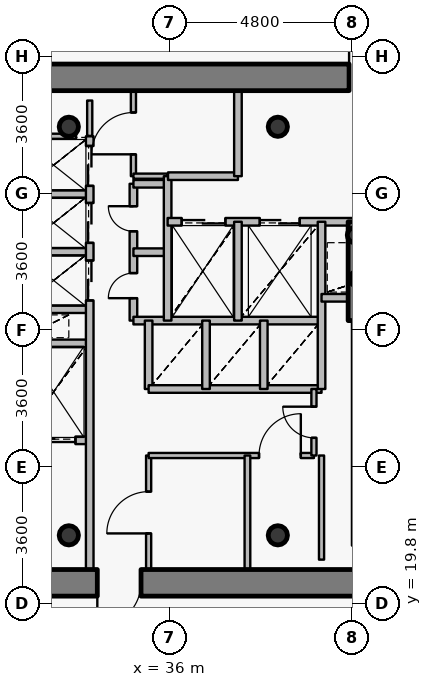
"""IFC4 building model, lengths in metres.
Left out: names, types, materials, properties, quantities, classifications, styles, units other than length and angle.
Written with IfcOpenShell. Run it as: python <this file> out.ifc"""

import sys

from ifc_helpers import new_model, si_unit, direction, frame, frame_2d, origin, origin_2d, place, context, subcontext, project, spatial, rectangle, hollow_circle, extrude, source, transform, mapped, element, fill, save


model = new_model("IFC4")
c1 = context("Model", 3, precision=1e-05, world=origin(), true_north=direction((0.0, 1.0)))
c2 = subcontext(c1, "Body", "Model", "MODEL_VIEW")
j1 = project(units=[si_unit("LENGTHUNIT", "METRE"), si_unit("PLANEANGLEUNIT", "RADIAN")], contexts=[c1])
p1 = place(None, origin())
s1 = spatial("IfcSite", under=j1, at=p1, CompositionType="ELEMENT")
p2 = place(p1, origin())
s2 = spatial("IfcBuilding", under=s1, at=p2, CompositionType="ELEMENT")
p3 = place(p2, frame((0.0, 0.0, 259.05)))
s3 = spatial("IfcBuildingStorey", under=s2, at=p3, CompositionType="ELEMENT", Elevation=259.05)
for number, where, z_axis, x_axis in (
    (1, (33.35, 21.6, 0.0), (0.0, 0.0, 1.0), (1.0, 0.0, 0.0)),
    (2, (38.85, 21.6, 0.0), (0.0, 0.0, 1.0), (1.0, 0.0, 0.0)),
    (3, (38.85, 32.35, 0.0), (0.0, 0.0, 1.0), (1.0, 0.0, 0.0)),
    (4, (33.35, 32.35, 0.0), (0.0, 0.0, 1.0), (1.0, 0.0, 0.0)),
):
    element("IfcColumn", number, at=place(p3, frame(where, z_axis=z_axis, x_axis=x_axis)), inside=s3, PredefinedType="COLUMN", context=c2, shape_type="SweptSolid", body=[
        extrude(hollow_circle(Radius=0.254, WallThickness=0.02, at=origin_2d()), origin(), (0.0, 0.0, 1.0), 3.75),
    ])
for number, where, z_axis, x_axis in (
    (5, (40.95, 28.35, 0.0), (0.0, 0.0, 1.0), (1.0, 0.0, 0.0)),
    (6, (40.88, 29.5, 0.0), (0.0, 0.0, 1.0), (1.0, 0.0, 0.0)),
):
    element("IfcColumn", number, at=place(p3, frame(where, z_axis=z_axis, x_axis=x_axis)), inside=s3, PredefinedType="COLUMN", context=c2, shape_type="SweptSolid", body=[
        extrude(hollow_circle(Radius=0.203, WallThickness=0.016, at=origin_2d()), origin(), (0.0, 0.0, 1.0), 3.75),
    ])
p4 = place(p3, frame((27.05, 33.65, 0.0), z_axis=(0.0, 0.0, 1.0), x_axis=(1.0, 0.0, 0.0)))
e7 = element("IfcWall", 7, at=p4, inside=s3, PredefinedType="SHEAR", context=c2, shape_type="SweptSolid", body=[
    extrude(rectangle(XDim=17.9, YDim=0.7, at=frame_2d((8.95, 0.0))), origin(), (0.0, 0.0, 1.0), 3.0),
])
p5 = place(p4, frame((13.675, 0.0, 0.0)))
e8 = element("IfcOpeningElement", 8, at=p5, cuts=e7, PredefinedType="OPENING", context=c2, shape_type="SweptSolid", body=[
    extrude(rectangle(XDim=1.15, YDim=2.15, at=origin_2d()), frame((0.575, 0.36, 1.075), z_axis=(0.0, -1.0, 0.0), x_axis=(1.0, 0.0, 0.0)), (0.0, 0.0, 1.0), 0.72),
])
p6 = place(p3, frame((44.95, 20.35, 0.0), z_axis=(0.0, 0.0, 1.0), x_axis=(-1.0, 0.0, 0.0)))
e9 = element("IfcWall", 9, at=p6, inside=s3, PredefinedType="SHEAR", context=c2, shape_type="SweptSolid", body=[
    extrude(rectangle(XDim=17.9, YDim=0.7, at=frame_2d((8.95, 0.0))), origin(), (0.0, 0.0, 1.0), 3.0),
])
p7 = place(p6, frame((9.7, 0.0, 0.0)))
e10 = element("IfcOpeningElement", 10, at=p7, cuts=e9, PredefinedType="OPENING", context=c2, shape_type="SweptSolid", body=[
    extrude(rectangle(XDim=1.15, YDim=2.15, at=origin_2d()), frame((0.575, 0.36, 1.075), z_axis=(0.0, -1.0, 0.0), x_axis=(1.0, 0.0, 0.0)), (0.0, 0.0, 1.0), 0.72),
])
p8 = place(p3, frame((40.9, 27.25, 0.0), z_axis=(0.0, 0.0, 1.0), x_axis=(0.0, 1.0, 0.0)))
e11 = element("IfcWall", 11, at=p8, inside=s3, PredefinedType="SHEAR", context=c2, shape_type="SweptSolid", body=[
    extrude(rectangle(XDim=2.6, YDim=0.4, at=frame_2d((1.3, 0.0))), origin(), (0.0, 0.0, 1.0), 3.05),
])
p9 = place(p3, frame((32.0, 24.1, 0.0), z_axis=(0.0, 0.0, 1.0), x_axis=(1.0, 0.0, 0.0)))
e12 = element("IfcWall", 12, at=p9, inside=s3, PredefinedType="PARTITIONING", context=c2, shape_type="SweptSolid", body=[
    extrude(rectangle(XDim=1.9, YDim=0.2, at=frame_2d((0.95, 0.0))), origin(), (0.0, 0.0, 1.0), 3.035),
])
p10 = place(p9, frame((0.375, 0.0, 0.0)))
e13 = element("IfcOpeningElement", 13, at=p10, cuts=e12, PredefinedType="OPENING", context=c2, shape_type="SweptSolid", body=[
    extrude(rectangle(XDim=1.15, YDim=2.15, at=origin_2d()), frame((0.575, 0.11, 1.075), z_axis=(0.0, -1.0, 0.0), x_axis=(1.0, 0.0, 0.0)), (0.0, 0.0, 1.0), 0.22),
])
for number, where, z_axis, x_axis in (
    (14, (32.0, 26.65, 0.0), (0.0, 0.0, 1.0), (1.0, 0.0, 0.0)),
    (15, (32.0, 27.55, 0.0), (0.0, 0.0, 1.0), (1.0, 0.0, 0.0)),
    (16, (32.0, 29.06, 0.0), (0.0, 0.0, 1.0), (1.0, 0.0, 0.0)),
    (17, (32.0, 30.58, 0.0), (0.0, 0.0, 1.0), (1.0, 0.0, 0.0)),
):
    element("IfcWall", number, at=place(p3, frame(where, z_axis=z_axis, x_axis=x_axis)), inside=s3, PredefinedType="PARTITIONING", context=c2, shape_type="SweptSolid", body=[
        extrude(rectangle(XDim=1.9, YDim=0.2, at=frame_2d((0.95, 0.0))), origin(), (0.0, 0.0, 1.0), 3.035),
    ])
p11 = place(p3, frame((33.9, 20.7, 0.0), z_axis=(0.0, 0.0, 1.0), x_axis=(0.0, 1.0, 0.0)))
e18 = element("IfcWall", 18, at=p11, inside=s3, PredefinedType="PARTITIONING", context=c2, shape_type="SweptSolid", body=[
    extrude(rectangle(XDim=11.4, YDim=0.2, at=frame_2d((5.7, 0.0))), origin(), (0.0, 0.0, 1.0), 3.035),
])
p12 = place(p11, frame((7.08, 0.0, 0.0)))
e19 = element("IfcOpeningElement", 19, at=p12, cuts=e18, PredefinedType="OPENING", context=c2, shape_type="SweptSolid", body=[
    extrude(rectangle(XDim=1.05, YDim=2.15, at=origin_2d()), frame((0.525, 0.11, 1.075), z_axis=(0.0, -1.0, 0.0), x_axis=(1.0, 0.0, 0.0)), (0.0, 0.0, 1.0), 0.22),
])
p13 = place(p11, frame((8.595, 0.0, 0.0)))
e20 = element("IfcOpeningElement", 20, at=p13, cuts=e18, PredefinedType="OPENING", context=c2, shape_type="SweptSolid", body=[
    extrude(rectangle(XDim=1.05, YDim=2.15, at=origin_2d()), frame((0.525, 0.11, 1.075), z_axis=(0.0, -1.0, 0.0), x_axis=(1.0, 0.0, 0.0)), (0.0, 0.0, 1.0), 0.22),
])
p14 = place(p11, frame((10.095, 0.0, 0.0)))
e21 = element("IfcOpeningElement", 21, at=p14, cuts=e18, PredefinedType="OPENING", context=c2, shape_type="SweptSolid", body=[
    extrude(rectangle(XDim=1.05, YDim=2.15, at=origin_2d()), frame((0.525, 0.11, 1.075), z_axis=(0.0, -1.0, 0.0), x_axis=(1.0, 0.0, 0.0)), (0.0, 0.0, 1.0), 0.22),
])
p15 = place(p3, frame((35.05, 27.25, 0.0), z_axis=(0.0, 0.0, 1.0), x_axis=(0.0, 1.0, 0.0)))
e22 = element("IfcWall", 22, at=p15, inside=s3, PredefinedType="PARTITIONING", context=c2, shape_type="SweptSolid", body=[
    extrude(rectangle(XDim=3.6, YDim=0.2, at=frame_2d((1.8, 0.0))), origin(), (0.0, 0.0, 1.0), 3.45),
])
p16 = place(p15, frame((0.59, 0.0, 0.0)))
e23 = element("IfcOpeningElement", 23, at=p16, cuts=e22, PredefinedType="OPENING", context=c2, shape_type="SweptSolid", body=[
    extrude(rectangle(XDim=0.66, YDim=2.05, at=origin_2d()), frame((0.33, 0.11, 1.025), z_axis=(0.0, -1.0, 0.0), x_axis=(1.0, 0.0, 0.0)), (0.0, 0.0, 1.0), 0.22),
])
p17 = place(p15, frame((2.35, 0.0, 0.0)))
e24 = element("IfcOpeningElement", 24, at=p17, cuts=e22, PredefinedType="OPENING", context=c2, shape_type="SweptSolid", body=[
    extrude(rectangle(XDim=0.66, YDim=2.05, at=origin_2d()), frame((0.33, 0.11, 1.025), z_axis=(0.0, -1.0, 0.0), x_axis=(1.0, 0.0, 0.0)), (0.0, 0.0, 1.0), 0.22),
])
p18 = place(p3, frame((35.05, 27.25, 0.0), z_axis=(0.0, 0.0, 1.0), x_axis=(1.0, 0.0, 0.0)))
e25 = element("IfcWall", 25, at=p18, inside=s3, PredefinedType="PARTITIONING", context=c2, shape_type="SweptSolid", body=[
    extrude(rectangle(XDim=4.95, YDim=0.2, at=frame_2d((2.475, 0.0))), origin(), (0.0, 0.0, 1.0), 3.035),
])
for number, where, z_axis, x_axis in (
    (26, (35.05, 29.05, 0.0), (0.0, 0.0, 1.0), (1.0, 0.0, 0.0)),
    (27, (35.05, 30.85, 0.0), (0.0, 0.0, 1.0), (1.0, 0.0, 0.0)),
):
    element("IfcWall", number, at=place(p3, frame(where, z_axis=z_axis, x_axis=x_axis)), inside=s3, PredefinedType="PARTITIONING", context=c2, shape_type="SweptSolid", body=[
        extrude(rectangle(XDim=0.9, YDim=0.2, at=frame_2d((0.45, 0.0))), origin(), (0.0, 0.0, 1.0), 3.45),
    ])
p19 = place(p3, frame((35.05, 31.05, 0.0), z_axis=(0.0, 0.0, 1.0), x_axis=(0.0, 1.0, 0.0)))
e28 = element("IfcWall", 28, at=p19, inside=s3, PredefinedType="PARTITIONING", context=c2, shape_type="SweptSolid", body=[
    extrude(rectangle(XDim=2.25, YDim=0.135, at=frame_2d((1.125, 0.0))), origin(), (0.0, 0.0, 1.0), 3.035),
])
p20 = place(p19, frame((0.575, 0.0, 0.0)))
e29 = element("IfcOpeningElement", 29, at=p20, cuts=e28, PredefinedType="OPENING", context=c2, shape_type="SweptSolid", body=[
    extrude(rectangle(XDim=1.1, YDim=2.15, at=origin_2d()), frame((0.55, 0.078, 1.075), z_axis=(0.0, -1.0, 0.0), x_axis=(1.0, 0.0, 0.0)), (0.0, 0.0, 1.0), 0.155),
])
p21 = place(p3, frame((35.05, 31.05, 0.0), z_axis=(0.0, 0.0, 1.0), x_axis=(1.0, 0.0, 0.0)))
e30 = element("IfcWall", 30, at=p21, inside=s3, PredefinedType="PARTITIONING", context=c2, shape_type="SweptSolid", body=[
    extrude(rectangle(XDim=0.9, YDim=0.135, at=frame_2d((0.45, 0.0))), origin(), (0.0, 0.0, 1.0), 3.45),
])
p22 = place(p3, frame((35.45, 20.7, 0.0), z_axis=(0.0, 0.0, 1.0), x_axis=(0.0, 1.0, 0.0)))
e31 = element("IfcWall", 31, at=p22, inside=s3, PredefinedType="PARTITIONING", context=c2, shape_type="SweptSolid", body=[
    extrude(rectangle(XDim=3.0, YDim=0.135, at=frame_2d((1.5, 0.0))), origin(), (0.0, 0.0, 1.0), 3.035),
])
p23 = place(p22, frame((0.95, 0.0, 0.0)))
e32 = element("IfcOpeningElement", 32, at=p23, cuts=e31, PredefinedType="OPENING", context=c2, shape_type="SweptSolid", body=[
    extrude(rectangle(XDim=1.1, YDim=2.15, at=origin_2d()), frame((0.55, 0.078, 1.075), z_axis=(0.0, -1.0, 0.0), x_axis=(1.0, 0.0, 0.0)), (0.0, 0.0, 1.0), 0.155),
])
p24 = place(p3, frame((35.45, 23.7, 0.0), z_axis=(0.0, 0.0, 1.0), x_axis=(1.0, 0.0, 0.0)))
e33 = element("IfcWall", 33, at=p24, inside=s3, PredefinedType="PARTITIONING", context=c2, shape_type="SweptSolid", body=[
    extrude(rectangle(XDim=4.35, YDim=0.135, at=frame_2d((2.175, 0.0))), origin(), (0.0, 0.0, 1.0), 3.035),
])
p25 = place(p24, frame((2.905, 0.0, 0.0)))
e34 = element("IfcOpeningElement", 34, at=p25, cuts=e33, PredefinedType="OPENING", context=c2, shape_type="SweptSolid", body=[
    extrude(rectangle(XDim=1.1, YDim=2.15, at=origin_2d()), frame((0.55, 0.078, 1.075), z_axis=(0.0, -1.0, 0.0), x_axis=(1.0, 0.0, 0.0)), (0.0, 0.0, 1.0), 0.155),
])
p26 = place(p3, frame((35.45, 25.45, 0.0), z_axis=(0.0, 0.0, 1.0), x_axis=(0.0, 1.0, 0.0)))
e35 = element("IfcWall", 35, at=p26, inside=s3, PredefinedType="PARTITIONING", context=c2, shape_type="SweptSolid", body=[
    extrude(rectangle(XDim=1.8, YDim=0.2, at=frame_2d((0.9, 0.0))), origin(), (0.0, 0.0, 1.0), 3.45),
])
p27 = place(p3, frame((35.45, 25.45, 0.0), z_axis=(0.0, 0.0, 1.0), x_axis=(1.0, 0.0, 0.0)))
e36 = element("IfcWall", 36, at=p27, inside=s3, PredefinedType="PARTITIONING", context=c2, shape_type="SweptSolid", body=[
    extrude(rectangle(XDim=4.55, YDim=0.2, at=frame_2d((2.275, 0.0))), origin(), (0.0, 0.0, 1.0), 3.035),
])
p28 = place(p3, frame((35.95, 27.25, 0.0), z_axis=(0.0, 0.0, 1.0), x_axis=(0.0, 1.0, 0.0)))
e37 = element("IfcWall", 37, at=p28, inside=s3, PredefinedType="PARTITIONING", context=c2, shape_type="SweptSolid", body=[
    extrude(rectangle(XDim=3.8, YDim=0.2, at=frame_2d((1.9, 0.0))), origin(), (0.0, 0.0, 1.0), 3.45),
])
p29 = place(p3, frame((35.95, 29.85, 0.0), z_axis=(0.0, 0.0, 1.0), x_axis=(1.0, 0.0, 0.0)))
e38 = element("IfcWall", 38, at=p29, inside=s3, PredefinedType="PARTITIONING", context=c2, shape_type="SweptSolid", body=[
    extrude(rectangle(XDim=8.49, YDim=0.2, at=frame_2d((4.245, 0.0))), origin(), (0.0, 0.0, 1.0), 3.035),
])
p30 = place(p29, frame((6.1, 0.0, 0.0)))
e39 = element("IfcOpeningElement", 39, at=p30, cuts=e38, PredefinedType="OPENING", context=c2, shape_type="SweptSolid", body=[
    extrude(rectangle(XDim=1.2, YDim=2.15, at=origin_2d()), frame((0.6, 0.11, 1.075), z_axis=(0.0, -1.0, 0.0), x_axis=(1.0, 0.0, 0.0)), (0.0, 0.0, 1.0), 0.22),
])
p31 = place(p29, frame((0.37, 0.0, 0.0)))
e40 = element("IfcOpeningElement", 40, at=p31, cuts=e38, PredefinedType="OPENING", context=c2, shape_type="SweptSolid", body=[
    extrude(rectangle(XDim=1.15, YDim=2.15, at=origin_2d()), frame((0.575, 0.11, 1.075), z_axis=(0.0, -1.0, 0.0), x_axis=(1.0, 0.0, 0.0)), (0.0, 0.0, 1.0), 0.22),
])
p32 = place(p29, frame((2.425, 0.0, 0.0)))
e41 = element("IfcOpeningElement", 41, at=p32, cuts=e38, PredefinedType="OPENING", context=c2, shape_type="SweptSolid", body=[
    extrude(rectangle(XDim=1.05, YDim=2.15, at=origin_2d()), frame((0.525, 0.11, 1.075), z_axis=(0.0, -1.0, 0.0), x_axis=(1.0, 0.0, 0.0)), (0.0, 0.0, 1.0), 0.22),
])
p33 = place(p3, frame((35.96, 31.05, 0.0), z_axis=(0.0, 0.0, 1.0), x_axis=(1.0, 0.0, 0.0)))
e42 = element("IfcWall", 42, at=p33, inside=s3, PredefinedType="PARTITIONING", context=c2, shape_type="SweptSolid", body=[
    extrude(rectangle(XDim=1.84, YDim=0.2, at=frame_2d((0.92, 0.0))), origin(), (0.0, 0.0, 1.0), 3.45),
])
p34 = place(p3, frame((36.96, 25.45, 0.0), z_axis=(0.0, 0.0, 1.0), x_axis=(0.0, 1.0, 0.0)))
e43 = element("IfcWall", 43, at=p34, inside=s3, PredefinedType="PARTITIONING", context=c2, shape_type="SweptSolid", body=[
    extrude(rectangle(XDim=1.8, YDim=0.2, at=frame_2d((0.9, 0.0))), origin(), (0.0, 0.0, 1.0), 3.45),
])
p35 = place(p3, frame((37.8, 27.25, 0.0), z_axis=(0.0, 0.0, 1.0), x_axis=(0.0, 1.0, 0.0)))
e44 = element("IfcWall", 44, at=p35, inside=s3, PredefinedType="PARTITIONING", context=c2, shape_type="SweptSolid", body=[
    extrude(rectangle(XDim=2.6, YDim=0.2, at=frame_2d((1.3, 0.0))), origin(), (0.0, 0.0, 1.0), 3.45),
])
p36 = place(p3, frame((37.8, 31.05, 0.0), z_axis=(0.0, 0.0, 1.0), x_axis=(0.0, 1.0, 0.0)))
e45 = element("IfcWall", 45, at=p36, inside=s3, PredefinedType="PARTITIONING", context=c2, shape_type="SweptSolid", body=[
    extrude(rectangle(XDim=2.25, YDim=0.2, at=frame_2d((1.125, 0.0))), origin(), (0.0, 0.0, 1.0), 3.035),
])
p37 = place(p3, frame((38.05, 20.18, 0.0), z_axis=(0.0, 0.0, 1.0), x_axis=(0.0, 1.0, 0.0)))
e46 = element("IfcWall", 46, at=p37, inside=s3, PredefinedType="PARTITIONING", context=c2, shape_type="SweptSolid", body=[
    extrude(rectangle(XDim=3.52, YDim=0.15, at=frame_2d((1.76, 0.0))), origin(), (0.0, 0.0, 1.0), 2.985),
])
p38 = place(p3, frame((38.48, 25.45, 0.0), z_axis=(0.0, 0.0, 1.0), x_axis=(0.0, 1.0, 0.0)))
e47 = element("IfcWall", 47, at=p38, inside=s3, PredefinedType="PARTITIONING", context=c2, shape_type="SweptSolid", body=[
    extrude(rectangle(XDim=1.8, YDim=0.2, at=frame_2d((0.9, 0.0))), origin(), (0.0, 0.0, 1.0), 3.45),
])
p39 = place(p3, frame((39.8, 23.7, 0.0), z_axis=(0.0, 0.0, 1.0), x_axis=(0.0, 1.0, 0.0)))
e48 = element("IfcWall", 48, at=p39, inside=s3, PredefinedType="PARTITIONING", context=c2, shape_type="SweptSolid", body=[
    extrude(rectangle(XDim=1.75, YDim=0.135, at=frame_2d((0.875, 0.0))), origin(), (0.0, 0.0, 1.0), 3.45),
])
p40 = place(p39, frame((0.465, 0.0, 0.0)))
e49 = element("IfcOpeningElement", 49, at=p40, cuts=e48, PredefinedType="OPENING", context=c2, shape_type="SweptSolid", body=[
    extrude(rectangle(XDim=0.82, YDim=2.1, at=origin_2d()), frame((0.41, 0.078, 1.05), z_axis=(0.0, -1.0, 0.0), x_axis=(1.0, 0.0, 0.0)), (0.0, 0.0, 1.0), 0.155),
])
p41 = place(p3, frame((40.0, 25.45, 0.0), z_axis=(0.0, 0.0, 1.0), x_axis=(0.0, 1.0, 0.0)))
e50 = element("IfcWall", 50, at=p41, inside=s3, PredefinedType="PARTITIONING", context=c2, shape_type="SweptSolid", body=[
    extrude(rectangle(XDim=4.4, YDim=0.2, at=frame_2d((2.2, 0.0))), origin(), (0.0, 0.0, 1.0), 3.45),
])
p42 = place(p3, frame((40.0, 27.85, 0.0), z_axis=(0.0, 0.0, 1.0), x_axis=(1.0, 0.0, 0.0)))
e51 = element("IfcWall", 51, at=p42, inside=s3, PredefinedType="PARTITIONING", context=c2, shape_type="SweptSolid", body=[
    extrude(rectangle(XDim=0.9, YDim=0.2, at=frame_2d((0.45, 0.0))), origin(), (0.0, 0.0, 1.0), 3.45),
])
p43 = place(p3, frame((40.9, 21.33, 0.0), z_axis=(0.0, 0.0, 1.0), x_axis=(0.0, 1.0, 0.0)))
e52 = element("IfcWall", 52, at=p43, inside=s3, PredefinedType="PARTITIONING", context=c2, shape_type="SweptSolid", body=[
    extrude(rectangle(XDim=5.91, YDim=0.2, at=frame_2d((2.955, 0.0))), origin(), (0.0, 0.0, 1.0), 2.985),
])
p44 = place(p3, frame((32.36, 32.1, 0.0), z_axis=(0.0, 0.0, 1.0), x_axis=(1.0, 0.0, 0.0)))
e53 = element("IfcWall", 53, at=p44, inside=s3, PredefinedType="PARTITIONING", context=c2, shape_type="SweptSolid", body=[
    extrude(rectangle(XDim=1.18, YDim=0.135, at=frame_2d((0.59, 0.0))), origin(), (0.0, 0.0, 1.0), 3.035),
])
p45 = place(p3, frame((40.0, 23.7, 0.0), z_axis=(0.0, 0.0, 1.0), x_axis=(0.0, -1.0, 0.0)))
e54 = element("IfcWall", 54, at=p45, inside=s3, PredefinedType="PARTITIONING", context=c2, shape_type="SweptSolid", body=[
    extrude(rectangle(XDim=2.74, YDim=0.135, at=frame_2d((1.37, 0.0))), origin(), (0.0, 0.0, 1.0), 2.985),
])
p46 = place(p3, frame((33.9, 32.11, 0.0), z_axis=(0.0, 0.0, 1.0), x_axis=(0.0, 1.0, 0.0)))
e55 = element("IfcWall", 55, at=p46, inside=s3, PredefinedType="PARTITIONING", context=c2, shape_type="SweptSolid", body=[
    extrude(rectangle(XDim=0.93, YDim=0.135, at=frame_2d((0.465, 0.0))), origin(), (0.0, 0.0, 1.0), 3.035),
])
m1 = source(origin(), c2, "Body", "SweptSolid", [
    extrude(rectangle(XDim=1.15, YDim=2.15, at=origin_2d()), frame((0.575, 0.025, 1.075), z_axis=(0.0, -1.0, 0.0), x_axis=(1.0, 0.0, 0.0)), (0.0, 0.0, 1.0), 0.05),
])
p47 = place(p5, origin())
e56 = element("IfcDoor", 56, at=p47, inside=s3, OperationType="SINGLE_SWING_LEFT", PredefinedType="DOOR", context=c2, shape_type="MappedRepresentation", body=[
    mapped(m1, transform((0.0, 0.0, 0.0), x_axis=(1.0, 0.0, 0.0), y_axis=(0.0, 1.0, 0.0), z_axis=(0.0, 0.0, 1.0), scale=1.0)),
])
fill(e8, e56)
p48 = place(p7, origin())
e57 = element("IfcDoor", 57, at=p48, inside=s3, OperationType="SINGLE_SWING_RIGHT", PredefinedType="DOOR", context=c2, shape_type="MappedRepresentation", body=[
    mapped(m1, transform((0.0, 0.0, 0.0), x_axis=(1.0, 0.0, 0.0), y_axis=(0.0, 1.0, 0.0), z_axis=(0.0, 0.0, 1.0), scale=1.0)),
])
fill(e10, e57)
m2 = source(origin(), c2, "Body", "SweptSolid", [
    extrude(rectangle(XDim=1.15, YDim=2.15, at=origin_2d()), frame((0.575, 0.025, 1.075), z_axis=(0.0, -1.0, 0.0), x_axis=(1.0, 0.0, 0.0)), (0.0, 0.0, 1.0), 0.05),
])
p49 = place(p31, origin())
e58 = element("IfcDoor", 58, at=p49, inside=s3, OperationType="DOUBLE_DOOR_SLIDING", PredefinedType="USERDEFINED", context=c2, shape_type="MappedRepresentation", body=[
    mapped(m2, transform((0.0, 0.0, 0.0), x_axis=(1.0, 0.0, 0.0), y_axis=(0.0, 1.0, 0.0), z_axis=(0.0, 0.0, 1.0), scale=1.0)),
])
fill(e40, e58)
p50 = place(p10, origin())
e59 = element("IfcDoor", 59, at=p50, inside=s3, OperationType="DOUBLE_DOOR_SLIDING", PredefinedType="USERDEFINED", context=c2, shape_type="MappedRepresentation", body=[
    mapped(m2, transform((0.0, 0.0, 0.0), x_axis=(1.0, 0.0, 0.0), y_axis=(0.0, 1.0, 0.0), z_axis=(0.0, 0.0, 1.0), scale=1.0)),
])
fill(e13, e59)
m3 = source(origin(), c2, "Body", "SweptSolid", [
    extrude(rectangle(XDim=1.05, YDim=2.15, at=origin_2d()), frame((0.525, 0.025, 1.075), z_axis=(0.0, -1.0, 0.0), x_axis=(1.0, 0.0, 0.0)), (0.0, 0.0, 1.0), 0.05),
])
p51 = place(p32, origin())
e60 = element("IfcDoor", 60, at=p51, inside=s3, OperationType="DOUBLE_DOOR_SLIDING", PredefinedType="USERDEFINED", context=c2, shape_type="MappedRepresentation", body=[
    mapped(m3, transform((0.0, 0.0, 0.0), x_axis=(1.0, 0.0, 0.0), y_axis=(0.0, 1.0, 0.0), z_axis=(0.0, 0.0, 1.0), scale=1.0)),
])
fill(e41, e60)
p52 = place(p12, origin())
e61 = element("IfcDoor", 61, at=p52, inside=s3, OperationType="DOUBLE_DOOR_SLIDING", PredefinedType="USERDEFINED", context=c2, shape_type="MappedRepresentation", body=[
    mapped(m3, transform((0.0, 0.0, 0.0), x_axis=(1.0, 0.0, 0.0), y_axis=(0.0, 1.0, 0.0), z_axis=(0.0, 0.0, 1.0), scale=1.0)),
])
fill(e19, e61)
p53 = place(p13, origin())
e62 = element("IfcDoor", 62, at=p53, inside=s3, OperationType="DOUBLE_DOOR_SLIDING", PredefinedType="USERDEFINED", context=c2, shape_type="MappedRepresentation", body=[
    mapped(m3, transform((0.0, 0.0, 0.0), x_axis=(1.0, 0.0, 0.0), y_axis=(0.0, 1.0, 0.0), z_axis=(0.0, 0.0, 1.0), scale=1.0)),
])
fill(e20, e62)
p54 = place(p14, origin())
e63 = element("IfcDoor", 63, at=p54, inside=s3, OperationType="DOUBLE_DOOR_SLIDING", PredefinedType="USERDEFINED", context=c2, shape_type="MappedRepresentation", body=[
    mapped(m3, transform((0.0, 0.0, 0.0), x_axis=(1.0, 0.0, 0.0), y_axis=(0.0, 1.0, 0.0), z_axis=(0.0, 0.0, 1.0), scale=1.0)),
])
fill(e21, e63)
m4 = source(origin(), c2, "Body", "SweptSolid", [
    extrude(rectangle(XDim=0.66, YDim=2.05, at=origin_2d()), frame((0.33, 0.025, 1.025), z_axis=(0.0, -1.0, 0.0), x_axis=(1.0, 0.0, 0.0)), (0.0, 0.0, 1.0), 0.05),
])
p55 = place(p16, origin())
e64 = element("IfcDoor", 64, at=p55, inside=s3, OperationType="SINGLE_SWING_LEFT", PredefinedType="USERDEFINED", context=c2, shape_type="MappedRepresentation", body=[
    mapped(m4, transform((0.0, 0.0, 0.0), x_axis=(1.0, 0.0, 0.0), y_axis=(0.0, 1.0, 0.0), z_axis=(0.0, 0.0, 1.0), scale=1.0)),
])
fill(e23, e64)
p56 = place(p17, origin())
e65 = element("IfcDoor", 65, at=p56, inside=s3, OperationType="SINGLE_SWING_RIGHT", PredefinedType="USERDEFINED", context=c2, shape_type="MappedRepresentation", body=[
    mapped(m4, transform((0.0, 0.0, 0.0), x_axis=(1.0, 0.0, 0.0), y_axis=(0.0, 1.0, 0.0), z_axis=(0.0, 0.0, 1.0), scale=1.0)),
])
fill(e24, e65)
m5 = source(origin(), c2, "Body", "SweptSolid", [
    extrude(rectangle(XDim=1.1, YDim=2.15, at=origin_2d()), frame((0.55, 0.025, 1.075), z_axis=(0.0, -1.0, 0.0), x_axis=(1.0, 0.0, 0.0)), (0.0, 0.0, 1.0), 0.05),
])
p57 = place(p23, origin())
e66 = element("IfcDoor", 66, at=p57, inside=s3, OperationType="SINGLE_SWING_LEFT", PredefinedType="DOOR", context=c2, shape_type="MappedRepresentation", body=[
    mapped(m5, transform((0.0, 0.0, 0.0), x_axis=(1.0, 0.0, 0.0), y_axis=(0.0, 1.0, 0.0), z_axis=(0.0, 0.0, 1.0), scale=1.0)),
])
fill(e32, e66)
p58 = place(p25, origin())
e67 = element("IfcDoor", 67, at=p58, inside=s3, OperationType="SINGLE_SWING_RIGHT", PredefinedType="DOOR", context=c2, shape_type="MappedRepresentation", body=[
    mapped(m5, transform((0.0, 0.0, 0.0), x_axis=(1.0, 0.0, 0.0), y_axis=(0.0, 1.0, 0.0), z_axis=(0.0, 0.0, 1.0), scale=1.0)),
])
fill(e34, e67)
p59 = place(p20, origin())
e68 = element("IfcDoor", 68, at=p59, inside=s3, OperationType="SINGLE_SWING_LEFT", PredefinedType="DOOR", context=c2, shape_type="MappedRepresentation", body=[
    mapped(m5, transform((0.0, 0.0, 0.0), x_axis=(1.0, 0.0, 0.0), y_axis=(0.0, 1.0, 0.0), z_axis=(0.0, 0.0, 1.0), scale=1.0)),
])
fill(e29, e68)
m6 = source(origin(), c2, "Body", "SweptSolid", [
    extrude(rectangle(XDim=0.82, YDim=2.1, at=origin_2d()), frame((0.41, 0.025, 1.05), z_axis=(0.0, -1.0, 0.0), x_axis=(1.0, 0.0, 0.0)), (0.0, 0.0, 1.0), 0.05),
])
p60 = place(p40, origin())
e69 = element("IfcDoor", 69, at=p60, inside=s3, OperationType="SINGLE_SWING_RIGHT", PredefinedType="DOOR", context=c2, shape_type="MappedRepresentation", body=[
    mapped(m6, transform((0.0, 0.0, 0.0), x_axis=(1.0, 0.0, 0.0), y_axis=(0.0, 1.0, 0.0), z_axis=(0.0, 0.0, 1.0), scale=1.0)),
])
fill(e49, e69)
save(model, sys.argv[1])
